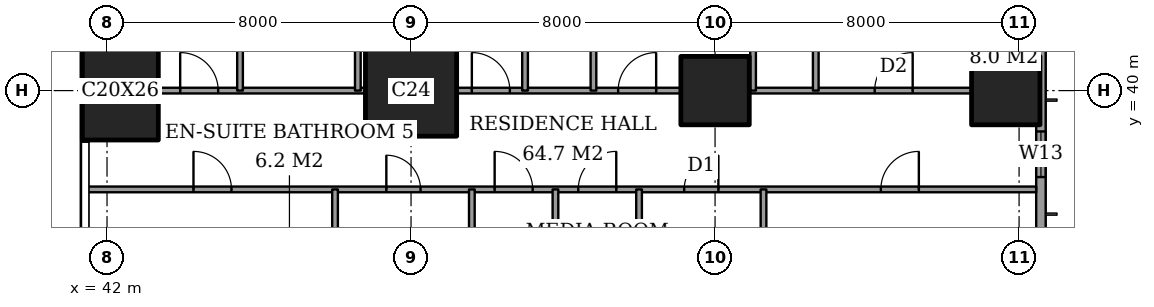
"""IFC4 building model, lengths in metres.
Left out: names, types, materials, properties, quantities, classifications, styles, units other than length and angle.
Written with IfcOpenShell. Run it as: python <this file> out.ifc"""

import sys

from ifc_helpers import new_model, si_unit, direction, frame, frame_2d, origin, origin_2d, place, context, subcontext, project, spatial, rectangle, extrude, element, fill, save


model = new_model("IFC4")
c1 = context("Model", 3, precision=1e-05, world=origin(), true_north=direction((0.0, 1.0)))
c2 = subcontext(c1, "Body", "Model", "MODEL_VIEW")
j1 = project(units=[si_unit("LENGTHUNIT", "METRE"), si_unit("PLANEANGLEUNIT", "RADIAN")], contexts=[c1])
p1 = place(None, origin())
s1 = spatial("IfcSite", under=j1, at=p1, CompositionType="ELEMENT")
p2 = place(p1, origin())
s2 = spatial("IfcBuilding", under=s1, at=p2, CompositionType="ELEMENT")
p3 = place(p2, frame((0.0, 0.0, 189.4)))
s3 = spatial("IfcBuildingStorey", under=s2, at=p3, CompositionType="ELEMENT", Elevation=189.4)
p4 = place(p3, frame((42.35, 40.0, 0.0), z_axis=(0.0, 0.0, 1.0), x_axis=(1.0, 0.0, 0.0)))
e1 = element("IfcColumn", 1, at=p4, inside=s3, PredefinedType="COLUMN", context=c2, shape_type="SweptSolid", body=[
    extrude(rectangle(XDim=2.0, YDim=2.6, at=origin_2d()), origin(), (0.0, 0.0, 1.0), 3.6),
])
p5 = place(p3, frame((50.0, 40.0, 0.0), z_axis=(0.0, 0.0, 1.0), x_axis=(1.0, 0.0, 0.0)))
e2 = element("IfcColumn", 2, at=p5, inside=s3, PredefinedType="COLUMN", context=c2, shape_type="SweptSolid", body=[
    extrude(rectangle(XDim=2.4, YDim=2.4, at=origin_2d()), origin(), (0.0, 0.0, 1.0), 3.6),
])
for number, where, z_axis, x_axis in (
    (3, (58.0, 40.0, 0.0), (0.0, 0.0, 1.0), (1.0, 0.0, 0.0)),
    (4, (65.65, 40.0, 0.0), (0.0, 0.0, 1.0), (1.0, 0.0, 0.0)),
):
    element("IfcColumn", number, at=place(p3, frame(where, z_axis=z_axis, x_axis=x_axis)), inside=s3, PredefinedType="COLUMN", context=c2, shape_type="SweptSolid", body=[
        extrude(rectangle(XDim=1.8, YDim=1.8, at=origin_2d()), origin(), (0.0, 0.0, 1.0), 3.6),
    ])
p6 = place(p3, frame((66.575, 3.175, 0.0), z_axis=(0.0, 0.0, 1.0), x_axis=(0.0, 1.0, 0.0)))
e5 = element("IfcWall", 5, at=p6, inside=s3, PredefinedType="SOLIDWALL", context=c2, shape_type="SweptSolid", body=[
    extrude(rectangle(XDim=41.65, YDim=0.25, at=frame_2d((20.825, 0.0))), origin(), (0.0, 0.0, 1.0), 3.6),
])
p7 = place(p6, frame((0.825, 0.0, 0.2)))
e6 = element("IfcOpeningElement", 6, at=p7, cuts=e5, PredefinedType="OPENING", context=c2, shape_type="SweptSolid", body=[
    extrude(rectangle(XDim=2.4, YDim=2.4, at=frame_2d((1.2, 1.2))), frame((0.0, 0.135, 0.0), z_axis=(0.0, -1.0, 0.0), x_axis=(1.0, 0.0, 0.0)), (0.0, 0.0, 1.0), 0.27),
])
p8 = place(p6, frame((6.6, 0.0, 0.2)))
e7 = element("IfcOpeningElement", 7, at=p8, cuts=e5, PredefinedType="OPENING", context=c2, shape_type="SweptSolid", body=[
    extrude(rectangle(XDim=1.2, YDim=2.4, at=frame_2d((0.6, 1.2))), frame((0.0, 0.135, 0.0), z_axis=(0.0, -1.0, 0.0), x_axis=(1.0, 0.0, 0.0)), (0.0, 0.0, 1.0), 0.27),
])
p9 = place(p6, frame((8.775, 0.0, 0.2)))
e8 = element("IfcOpeningElement", 8, at=p9, cuts=e5, PredefinedType="OPENING", context=c2, shape_type="SweptSolid", body=[
    extrude(rectangle(XDim=2.4, YDim=2.4, at=frame_2d((1.2, 1.2))), frame((0.0, 0.135, 0.0), z_axis=(0.0, -1.0, 0.0), x_axis=(1.0, 0.0, 0.0)), (0.0, 0.0, 1.0), 0.27),
])
p10 = place(p6, frame((15.675, 0.0, 0.2)))
e9 = element("IfcOpeningElement", 9, at=p10, cuts=e5, PredefinedType="OPENING", context=c2, shape_type="SweptSolid", body=[
    extrude(rectangle(XDim=2.4, YDim=2.4, at=frame_2d((1.2, 1.2))), frame((0.0, 0.135, 0.0), z_axis=(0.0, -1.0, 0.0), x_axis=(1.0, 0.0, 0.0)), (0.0, 0.0, 1.0), 0.27),
])
p11 = place(p6, frame((23.575, 0.0, 0.2)))
e10 = element("IfcOpeningElement", 10, at=p11, cuts=e5, PredefinedType="OPENING", context=c2, shape_type="SweptSolid", body=[
    extrude(rectangle(XDim=2.4, YDim=2.4, at=frame_2d((1.2, 1.2))), frame((0.0, 0.135, 0.0), z_axis=(0.0, -1.0, 0.0), x_axis=(1.0, 0.0, 0.0)), (0.0, 0.0, 1.0), 0.27),
])
p12 = place(p6, frame((30.775, 0.0, 0.2)))
e11 = element("IfcOpeningElement", 11, at=p12, cuts=e5, PredefinedType="OPENING", context=c2, shape_type="SweptSolid", body=[
    extrude(rectangle(XDim=2.4, YDim=2.4, at=frame_2d((1.2, 1.2))), frame((0.0, 0.135, 0.0), z_axis=(0.0, -1.0, 0.0), x_axis=(1.0, 0.0, 0.0)), (0.0, 0.0, 1.0), 0.27),
])
p13 = place(p6, frame((34.55, 0.0, 0.2)))
e12 = element("IfcOpeningElement", 12, at=p13, cuts=e5, PredefinedType="OPENING", context=c2, shape_type="SweptSolid", body=[
    extrude(rectangle(XDim=1.2, YDim=2.4, at=frame_2d((0.6, 1.2))), frame((0.0, 0.135, 0.0), z_axis=(0.0, -1.0, 0.0), x_axis=(1.0, 0.0, 0.0)), (0.0, 0.0, 1.0), 0.27),
])
p14 = place(p6, frame((38.425, 0.0, 0.2)))
e13 = element("IfcOpeningElement", 13, at=p14, cuts=e5, PredefinedType="OPENING", context=c2, shape_type="SweptSolid", body=[
    extrude(rectangle(XDim=2.4, YDim=2.4, at=frame_2d((1.2, 1.2))), frame((0.0, 0.135, 0.0), z_axis=(0.0, -1.0, 0.0), x_axis=(1.0, 0.0, 0.0)), (0.0, 0.0, 1.0), 0.27),
])
p15 = place(p3, frame((41.439, 37.4, 0.0), z_axis=(0.0, 0.0, 1.0), x_axis=(1.0, 0.0, 0.0)))
e14 = element("IfcWall", 14, at=p15, inside=s3, PredefinedType="PARTITIONING", context=c2, shape_type="SweptSolid", body=[
    extrude(rectangle(XDim=25.011, YDim=0.15, at=frame_2d((12.505, 0.0))), origin(), (0.0, 0.0, 1.0), 3.35),
])
p16 = place(p15, frame((10.761, 0.0, 0.0)))
e15 = element("IfcOpeningElement", 15, at=p16, cuts=e14, PredefinedType="OPENING", context=c2, shape_type="SweptSolid", body=[
    extrude(rectangle(XDim=1.0, YDim=2.1, at=frame_2d((0.5, 1.05))), frame((0.0, 0.085, 0.0), z_axis=(0.0, -1.0, 0.0), x_axis=(1.0, 0.0, 0.0)), (0.0, 0.0, 1.0), 0.17),
])
p17 = place(p15, frame((20.924, 0.0, 0.0)))
e16 = element("IfcOpeningElement", 16, at=p17, cuts=e14, PredefinedType="OPENING", context=c2, shape_type="SweptSolid", body=[
    extrude(rectangle(XDim=1.0, YDim=2.1, at=frame_2d((0.5, 1.05))), frame((0.0, 0.085, 0.0), z_axis=(0.0, -1.0, 0.0), x_axis=(1.0, 0.0, 0.0)), (0.0, 0.0, 1.0), 0.17),
])
p18 = place(p15, frame((15.749, 0.0, 0.0)))
e17 = element("IfcOpeningElement", 17, at=p18, cuts=e14, PredefinedType="OPENING", context=c2, shape_type="SweptSolid", body=[
    extrude(rectangle(XDim=0.9, YDim=2.1, at=frame_2d((0.45, 1.05))), frame((0.0, 0.085, 0.0), z_axis=(0.0, -1.0, 0.0), x_axis=(1.0, 0.0, 0.0)), (0.0, 0.0, 1.0), 0.17),
])
p19 = place(p15, frame((12.961, 0.0, 0.0)))
e18 = element("IfcOpeningElement", 18, at=p19, cuts=e14, PredefinedType="OPENING", context=c2, shape_type="SweptSolid", body=[
    extrude(rectangle(XDim=1.0, YDim=2.1, at=frame_2d((0.5, 1.05))), frame((0.0, 0.085, 0.0), z_axis=(0.0, -1.0, 0.0), x_axis=(1.0, 0.0, 0.0)), (0.0, 0.0, 1.0), 0.17),
])
p20 = place(p15, frame((7.911, 0.0, 0.0)))
e19 = element("IfcOpeningElement", 19, at=p20, cuts=e14, PredefinedType="OPENING", context=c2, shape_type="SweptSolid", body=[
    extrude(rectangle(XDim=0.9, YDim=2.1, at=frame_2d((0.45, 1.05))), frame((0.0, 0.085, 0.0), z_axis=(0.0, -1.0, 0.0), x_axis=(1.0, 0.0, 0.0)), (0.0, 0.0, 1.0), 0.17),
])
p21 = place(p15, frame((2.836, 0.0, 0.0)))
e20 = element("IfcOpeningElement", 20, at=p21, cuts=e14, PredefinedType="OPENING", context=c2, shape_type="SweptSolid", body=[
    extrude(rectangle(XDim=1.0, YDim=2.1, at=frame_2d((0.5, 1.05))), frame((0.0, 0.085, 0.0), z_axis=(0.0, -1.0, 0.0), x_axis=(1.0, 0.0, 0.0)), (0.0, 0.0, 1.0), 0.17),
])
p22 = place(p3, frame((43.35, 40.0, 0.0), z_axis=(0.0, 0.0, 1.0), x_axis=(1.0, 0.0, 0.0)))
e21 = element("IfcWall", 21, at=p22, inside=s3, PredefinedType="PARTITIONING", context=c2, shape_type="SweptSolid", body=[
    extrude(rectangle(XDim=5.45, YDim=0.15, at=frame_2d((2.725, 0.0))), origin(), (0.0, 0.0, 1.0), 3.35),
])
p23 = place(p22, frame((0.575, 0.0, 0.0)))
e22 = element("IfcOpeningElement", 22, at=p23, cuts=e21, PredefinedType="OPENING", context=c2, shape_type="SweptSolid", body=[
    extrude(rectangle(XDim=1.0, YDim=2.1, at=frame_2d((0.5, 1.05))), frame((0.0, 0.085, 0.0), z_axis=(0.0, -1.0, 0.0), x_axis=(1.0, 0.0, 0.0)), (0.0, 0.0, 1.0), 0.17),
])
p24 = place(p3, frame((51.2, 40.0, 0.0), z_axis=(0.0, 0.0, 1.0), x_axis=(1.0, 0.0, 0.0)))
e23 = element("IfcWall", 23, at=p24, inside=s3, PredefinedType="PARTITIONING", context=c2, shape_type="SweptSolid", body=[
    extrude(rectangle(XDim=5.9, YDim=0.15, at=frame_2d((2.95, 0.0))), origin(), (0.0, 0.0, 1.0), 3.35),
])
p25 = place(p24, frame((4.25, 0.0, 0.0)))
e24 = element("IfcOpeningElement", 24, at=p25, cuts=e23, PredefinedType="OPENING", context=c2, shape_type="SweptSolid", body=[
    extrude(rectangle(XDim=1.0, YDim=2.1, at=frame_2d((0.5, 1.05))), frame((0.0, 0.085, 0.0), z_axis=(0.0, -1.0, 0.0), x_axis=(1.0, 0.0, 0.0)), (0.0, 0.0, 1.0), 0.17),
])
p26 = place(p24, frame((0.4, 0.0, 0.0)))
e25 = element("IfcOpeningElement", 25, at=p26, cuts=e23, PredefinedType="OPENING", context=c2, shape_type="SweptSolid", body=[
    extrude(rectangle(XDim=1.0, YDim=2.1, at=frame_2d((0.5, 1.05))), frame((0.0, 0.085, 0.0), z_axis=(0.0, -1.0, 0.0), x_axis=(1.0, 0.0, 0.0)), (0.0, 0.0, 1.0), 0.17),
])
p27 = place(p3, frame((58.9, 40.0, 0.0), z_axis=(0.0, 0.0, 1.0), x_axis=(1.0, 0.0, 0.0)))
e26 = element("IfcWall", 26, at=p27, inside=s3, PredefinedType="PARTITIONING", context=c2, shape_type="SweptSolid", body=[
    extrude(rectangle(XDim=5.85, YDim=0.15, at=frame_2d((2.925, 0.0))), origin(), (0.0, 0.0, 1.0), 3.35),
])
p28 = place(p27, frame((3.3, 0.0, 0.0)))
e27 = element("IfcOpeningElement", 27, at=p28, cuts=e26, PredefinedType="OPENING", context=c2, shape_type="SweptSolid", body=[
    extrude(rectangle(XDim=1.0, YDim=2.1, at=frame_2d((0.5, 1.05))), frame((0.0, 0.085, 0.0), z_axis=(0.0, -1.0, 0.0), x_axis=(1.0, 0.0, 0.0)), (0.0, 0.0, 1.0), 0.17),
])
p29 = place(p3, frame((45.5, 40.0, 0.0), z_axis=(0.0, 0.0, 1.0), x_axis=(0.0, 1.0, 0.0)))
e28 = element("IfcWall", 28, at=p29, inside=s3, PredefinedType="PARTITIONING", context=c2, shape_type="SweptSolid", body=[
    extrude(rectangle(XDim=8.45, YDim=0.15, at=frame_2d((4.225, 0.0))), origin(), (0.0, 0.0, 1.0), 3.35),
])
p30 = place(p3, frame((48.0, 28.0, 0.0), z_axis=(0.0, 0.0, 1.0), x_axis=(0.0, 1.0, 0.0)))
e29 = element("IfcWall", 29, at=p30, inside=s3, PredefinedType="PARTITIONING", context=c2, shape_type="SweptSolid", body=[
    extrude(rectangle(XDim=9.4, YDim=0.15, at=frame_2d((4.7, 0.0))), origin(), (0.0, 0.0, 1.0), 3.35),
])
p31 = place(p30, frame((0.5, 0.0, 0.0)))
e30 = element("IfcOpeningElement", 30, at=p31, cuts=e29, PredefinedType="OPENING", context=c2, shape_type="SweptSolid", body=[
    extrude(rectangle(XDim=1.0, YDim=2.1, at=frame_2d((0.5, 1.05))), frame((0.0, 0.085, 0.0), z_axis=(0.0, -1.0, 0.0), x_axis=(1.0, 0.0, 0.0)), (0.0, 0.0, 1.0), 0.17),
])
p32 = place(p3, frame((48.6, 40.0, 0.0), z_axis=(0.0, 0.0, 1.0), x_axis=(0.0, 1.0, 0.0)))
e31 = element("IfcWall", 31, at=p32, inside=s3, PredefinedType="PARTITIONING", context=c2, shape_type="SweptSolid", body=[
    extrude(rectangle(XDim=8.45, YDim=0.15, at=frame_2d((4.225, 0.0))), origin(), (0.0, 0.0, 1.0), 3.35),
])
p33 = place(p32, frame((3.775, 0.0, 0.0)))
e32 = element("IfcOpeningElement", 32, at=p33, cuts=e31, PredefinedType="OPENING", context=c2, shape_type="SweptSolid", body=[
    extrude(rectangle(XDim=0.9, YDim=2.1, at=frame_2d((0.45, 1.05))), frame((0.0, 0.085, 0.0), z_axis=(0.0, -1.0, 0.0), x_axis=(1.0, 0.0, 0.0)), (0.0, 0.0, 1.0), 0.17),
])
p34 = place(p3, frame((51.6, 30.0, 0.0), z_axis=(0.0, 0.0, 1.0), x_axis=(0.0, 1.0, 0.0)))
e33 = element("IfcWall", 33, at=p34, inside=s3, PredefinedType="PARTITIONING", context=c2, shape_type="SweptSolid", body=[
    extrude(rectangle(XDim=7.4, YDim=0.15, at=frame_2d((3.7, 0.0))), origin(), (0.0, 0.0, 1.0), 3.35),
])
p35 = place(p3, frame((53.0, 40.0, 0.0), z_axis=(0.0, 0.0, 1.0), x_axis=(0.0, 1.0, 0.0)))
e34 = element("IfcWall", 34, at=p35, inside=s3, PredefinedType="PARTITIONING", context=c2, shape_type="SweptSolid", body=[
    extrude(rectangle(XDim=8.45, YDim=0.15, at=frame_2d((4.225, 0.0))), origin(), (0.0, 0.0, 1.0), 3.35),
])
p36 = place(p3, frame((53.8, 30.0, 0.0), z_axis=(0.0, 0.0, 1.0), x_axis=(0.0, 1.0, 0.0)))
e35 = element("IfcWall", 35, at=p36, inside=s3, PredefinedType="PARTITIONING", context=c2, shape_type="SweptSolid", body=[
    extrude(rectangle(XDim=7.4, YDim=0.15, at=frame_2d((3.7, 0.0))), origin(), (0.0, 0.0, 1.0), 3.35),
])
p37 = place(p3, frame((54.8, 40.0, 0.0), z_axis=(0.0, 0.0, 1.0), x_axis=(0.0, 1.0, 0.0)))
e36 = element("IfcWall", 36, at=p37, inside=s3, PredefinedType="PARTITIONING", context=c2, shape_type="SweptSolid", body=[
    extrude(rectangle(XDim=8.45, YDim=0.15, at=frame_2d((4.225, 0.0))), origin(), (0.0, 0.0, 1.0), 3.35),
])
p38 = place(p37, frame((3.775, 0.0, 0.0)))
e37 = element("IfcOpeningElement", 37, at=p38, cuts=e36, PredefinedType="OPENING", context=c2, shape_type="SweptSolid", body=[
    extrude(rectangle(XDim=0.9, YDim=2.1, at=frame_2d((0.45, 1.05))), frame((0.0, 0.085, 0.0), z_axis=(0.0, -1.0, 0.0), x_axis=(1.0, 0.0, 0.0)), (0.0, 0.0, 1.0), 0.17),
])
p39 = place(p3, frame((56.0, 28.0, 0.0), z_axis=(0.0, 0.0, 1.0), x_axis=(0.0, 1.0, 0.0)))
e38 = element("IfcWall", 38, at=p39, inside=s3, PredefinedType="PARTITIONING", context=c2, shape_type="SweptSolid", body=[
    extrude(rectangle(XDim=9.4, YDim=0.15, at=frame_2d((4.7, 0.0))), origin(), (0.0, 0.0, 1.0), 3.35),
])
p40 = place(p39, frame((0.5, 0.0, 0.0)))
e39 = element("IfcOpeningElement", 39, at=p40, cuts=e38, PredefinedType="OPENING", context=c2, shape_type="SweptSolid", body=[
    extrude(rectangle(XDim=1.0, YDim=2.1, at=frame_2d((0.5, 1.05))), frame((0.0, 0.085, 0.0), z_axis=(0.0, -1.0, 0.0), x_axis=(1.0, 0.0, 0.0)), (0.0, 0.0, 1.0), 0.17),
])
p41 = place(p3, frame((59.0, 40.0, 0.0), z_axis=(0.0, 0.0, 1.0), x_axis=(0.0, 1.0, 0.0)))
e40 = element("IfcWall", 40, at=p41, inside=s3, PredefinedType="PARTITIONING", context=c2, shape_type="SweptSolid", body=[
    extrude(rectangle(XDim=8.45, YDim=0.15, at=frame_2d((4.225, 0.0))), origin(), (0.0, 0.0, 1.0), 3.35),
])
p42 = place(p3, frame((59.275, 33.2, 0.0), z_axis=(0.0, 0.0, 1.0), x_axis=(0.0, 1.0, 0.0)))
e41 = element("IfcWall", 41, at=p42, inside=s3, PredefinedType="PARTITIONING", context=c2, shape_type="SweptSolid", body=[
    extrude(rectangle(XDim=4.2, YDim=0.15, at=frame_2d((2.1, 0.0))), origin(), (0.0, 0.0, 1.0), 3.35),
])
p43 = place(p3, frame((60.65, 40.0, 0.0), z_axis=(0.0, 0.0, 1.0), x_axis=(0.0, 1.0, 0.0)))
e42 = element("IfcWall", 42, at=p43, inside=s3, PredefinedType="PARTITIONING", context=c2, shape_type="SweptSolid", body=[
    extrude(rectangle(XDim=8.45, YDim=0.15, at=frame_2d((4.225, 0.0))), origin(), (0.0, 0.0, 1.0), 3.35),
])
p44 = place(p43, frame((3.775, 0.0, 0.0)))
e43 = element("IfcOpeningElement", 43, at=p44, cuts=e42, PredefinedType="OPENING", context=c2, shape_type="SweptSolid", body=[
    extrude(rectangle(XDim=0.9, YDim=2.1, at=frame_2d((0.45, 1.05))), frame((0.0, 0.085, 0.0), z_axis=(0.0, -1.0, 0.0), x_axis=(1.0, 0.0, 0.0)), (0.0, 0.0, 1.0), 0.17),
])
p45 = place(p3, frame((64.75, 40.9, 0.0), z_axis=(0.0, 0.0, 1.0), x_axis=(0.0, 1.0, 0.0)))
e44 = element("IfcWall", 44, at=p45, inside=s3, PredefinedType="PARTITIONING", context=c2, shape_type="SweptSolid", body=[
    extrude(rectangle(XDim=3.8, YDim=0.15, at=frame_2d((1.9, 0.0))), origin(), (0.0, 0.0, 1.0), 3.35),
])
p46 = place(p45, frame((1.45, 0.0, 0.0)))
e45 = element("IfcOpeningElement", 45, at=p46, cuts=e44, PredefinedType="OPENING", context=c2, shape_type="SweptSolid", body=[
    extrude(rectangle(XDim=0.9, YDim=2.1, at=frame_2d((0.45, 1.05))), frame((0.0, 0.085, 0.0), z_axis=(0.0, -1.0, 0.0), x_axis=(1.0, 0.0, 0.0)), (0.0, 0.0, 1.0), 0.17),
])
p47 = place(p13, origin())
e46 = element("IfcWindow", 46, at=p47, inside=s3, PartitioningType="SINGLE_PANEL", PredefinedType="WINDOW", context=c2, shape_type="SweptSolid", body=[
    extrude(rectangle(XDim=1.2, YDim=2.4, at=frame_2d((0.6, 1.2))), frame((0.0, 0.03, 0.0), z_axis=(0.0, -1.0, 0.0), x_axis=(1.0, 0.0, 0.0)), (0.0, 0.0, 1.0), 0.06),
])
fill(e12, e46)
p48 = place(p28, origin())
e47 = element("IfcDoor", 47, at=p48, inside=s3, OperationType="SINGLE_SWING_LEFT", PredefinedType="DOOR", context=c2, shape_type="SweptSolid", body=[
    extrude(rectangle(XDim=1.0, YDim=2.1, at=frame_2d((0.5, 1.05))), frame((0.0, 0.025, 0.0), z_axis=(0.0, -1.0, 0.0), x_axis=(1.0, 0.0, 0.0)), (0.0, 0.0, 1.0), 0.05),
])
fill(e27, e47)
p49 = place(p25, origin())
e48 = element("IfcDoor", 48, at=p49, inside=s3, OperationType="SINGLE_SWING_LEFT", PredefinedType="DOOR", context=c2, shape_type="SweptSolid", body=[
    extrude(rectangle(XDim=1.0, YDim=2.1, at=frame_2d((0.5, 1.05))), frame((0.0, 0.025, 0.0), z_axis=(0.0, -1.0, 0.0), x_axis=(1.0, 0.0, 0.0)), (0.0, 0.0, 1.0), 0.05),
])
fill(e24, e48)
p50 = place(p26, origin())
e49 = element("IfcDoor", 49, at=p50, inside=s3, OperationType="SINGLE_SWING_RIGHT", PredefinedType="DOOR", context=c2, shape_type="SweptSolid", body=[
    extrude(rectangle(XDim=1.0, YDim=2.1, at=frame_2d((0.5, 1.05))), frame((0.0, 0.025, 0.0), z_axis=(0.0, -1.0, 0.0), x_axis=(1.0, 0.0, 0.0)), (0.0, 0.0, 1.0), 0.05),
])
fill(e25, e49)
p51 = place(p23, origin())
e50 = element("IfcDoor", 50, at=p51, inside=s3, OperationType="SINGLE_SWING_RIGHT", PredefinedType="DOOR", context=c2, shape_type="SweptSolid", body=[
    extrude(rectangle(XDim=1.0, YDim=2.1, at=frame_2d((0.5, 1.05))), frame((0.0, 0.025, 0.0), z_axis=(0.0, -1.0, 0.0), x_axis=(1.0, 0.0, 0.0)), (0.0, 0.0, 1.0), 0.05),
])
fill(e22, e50)
p52 = place(p16, origin())
e51 = element("IfcDoor", 51, at=p52, inside=s3, OperationType="SINGLE_SWING_RIGHT", PredefinedType="DOOR", context=c2, shape_type="SweptSolid", body=[
    extrude(rectangle(XDim=1.0, YDim=2.1, at=frame_2d((0.5, 1.05))), frame((0.0, 0.025, 0.0), z_axis=(0.0, -1.0, 0.0), x_axis=(1.0, 0.0, 0.0)), (0.0, 0.0, 1.0), 0.05),
])
fill(e15, e51)
p53 = place(p17, origin())
e52 = element("IfcDoor", 52, at=p53, inside=s3, OperationType="SINGLE_SWING_LEFT", PredefinedType="DOOR", context=c2, shape_type="SweptSolid", body=[
    extrude(rectangle(XDim=1.0, YDim=2.1, at=frame_2d((0.5, 1.05))), frame((0.0, 0.025, 0.0), z_axis=(0.0, -1.0, 0.0), x_axis=(1.0, 0.0, 0.0)), (0.0, 0.0, 1.0), 0.05),
])
fill(e16, e52)
p54 = place(p18, origin())
e53 = element("IfcDoor", 53, at=p54, inside=s3, OperationType="SINGLE_SWING_LEFT", PredefinedType="DOOR", context=c2, shape_type="SweptSolid", body=[
    extrude(rectangle(XDim=0.9, YDim=2.1, at=frame_2d((0.45, 1.05))), frame((0.0, 0.025, 0.0), z_axis=(0.0, -1.0, 0.0), x_axis=(1.0, 0.0, 0.0)), (0.0, 0.0, 1.0), 0.05),
])
fill(e17, e53)
p55 = place(p19, origin())
e54 = element("IfcDoor", 54, at=p55, inside=s3, OperationType="SINGLE_SWING_LEFT", PredefinedType="DOOR", context=c2, shape_type="SweptSolid", body=[
    extrude(rectangle(XDim=1.0, YDim=2.1, at=frame_2d((0.5, 1.05))), frame((0.0, 0.025, 0.0), z_axis=(0.0, -1.0, 0.0), x_axis=(1.0, 0.0, 0.0)), (0.0, 0.0, 1.0), 0.05),
])
fill(e18, e54)
p56 = place(p20, origin())
e55 = element("IfcDoor", 55, at=p56, inside=s3, OperationType="SINGLE_SWING_RIGHT", PredefinedType="DOOR", context=c2, shape_type="SweptSolid", body=[
    extrude(rectangle(XDim=0.9, YDim=2.1, at=frame_2d((0.45, 1.05))), frame((0.0, 0.025, 0.0), z_axis=(0.0, -1.0, 0.0), x_axis=(1.0, 0.0, 0.0)), (0.0, 0.0, 1.0), 0.05),
])
fill(e19, e55)
p57 = place(p21, origin())
e56 = element("IfcDoor", 56, at=p57, inside=s3, OperationType="SINGLE_SWING_RIGHT", PredefinedType="DOOR", context=c2, shape_type="SweptSolid", body=[
    extrude(rectangle(XDim=1.0, YDim=2.1, at=frame_2d((0.5, 1.05))), frame((0.0, 0.025, 0.0), z_axis=(0.0, -1.0, 0.0), x_axis=(1.0, 0.0, 0.0)), (0.0, 0.0, 1.0), 0.05),
])
fill(e20, e56)
save(model, sys.argv[1])
